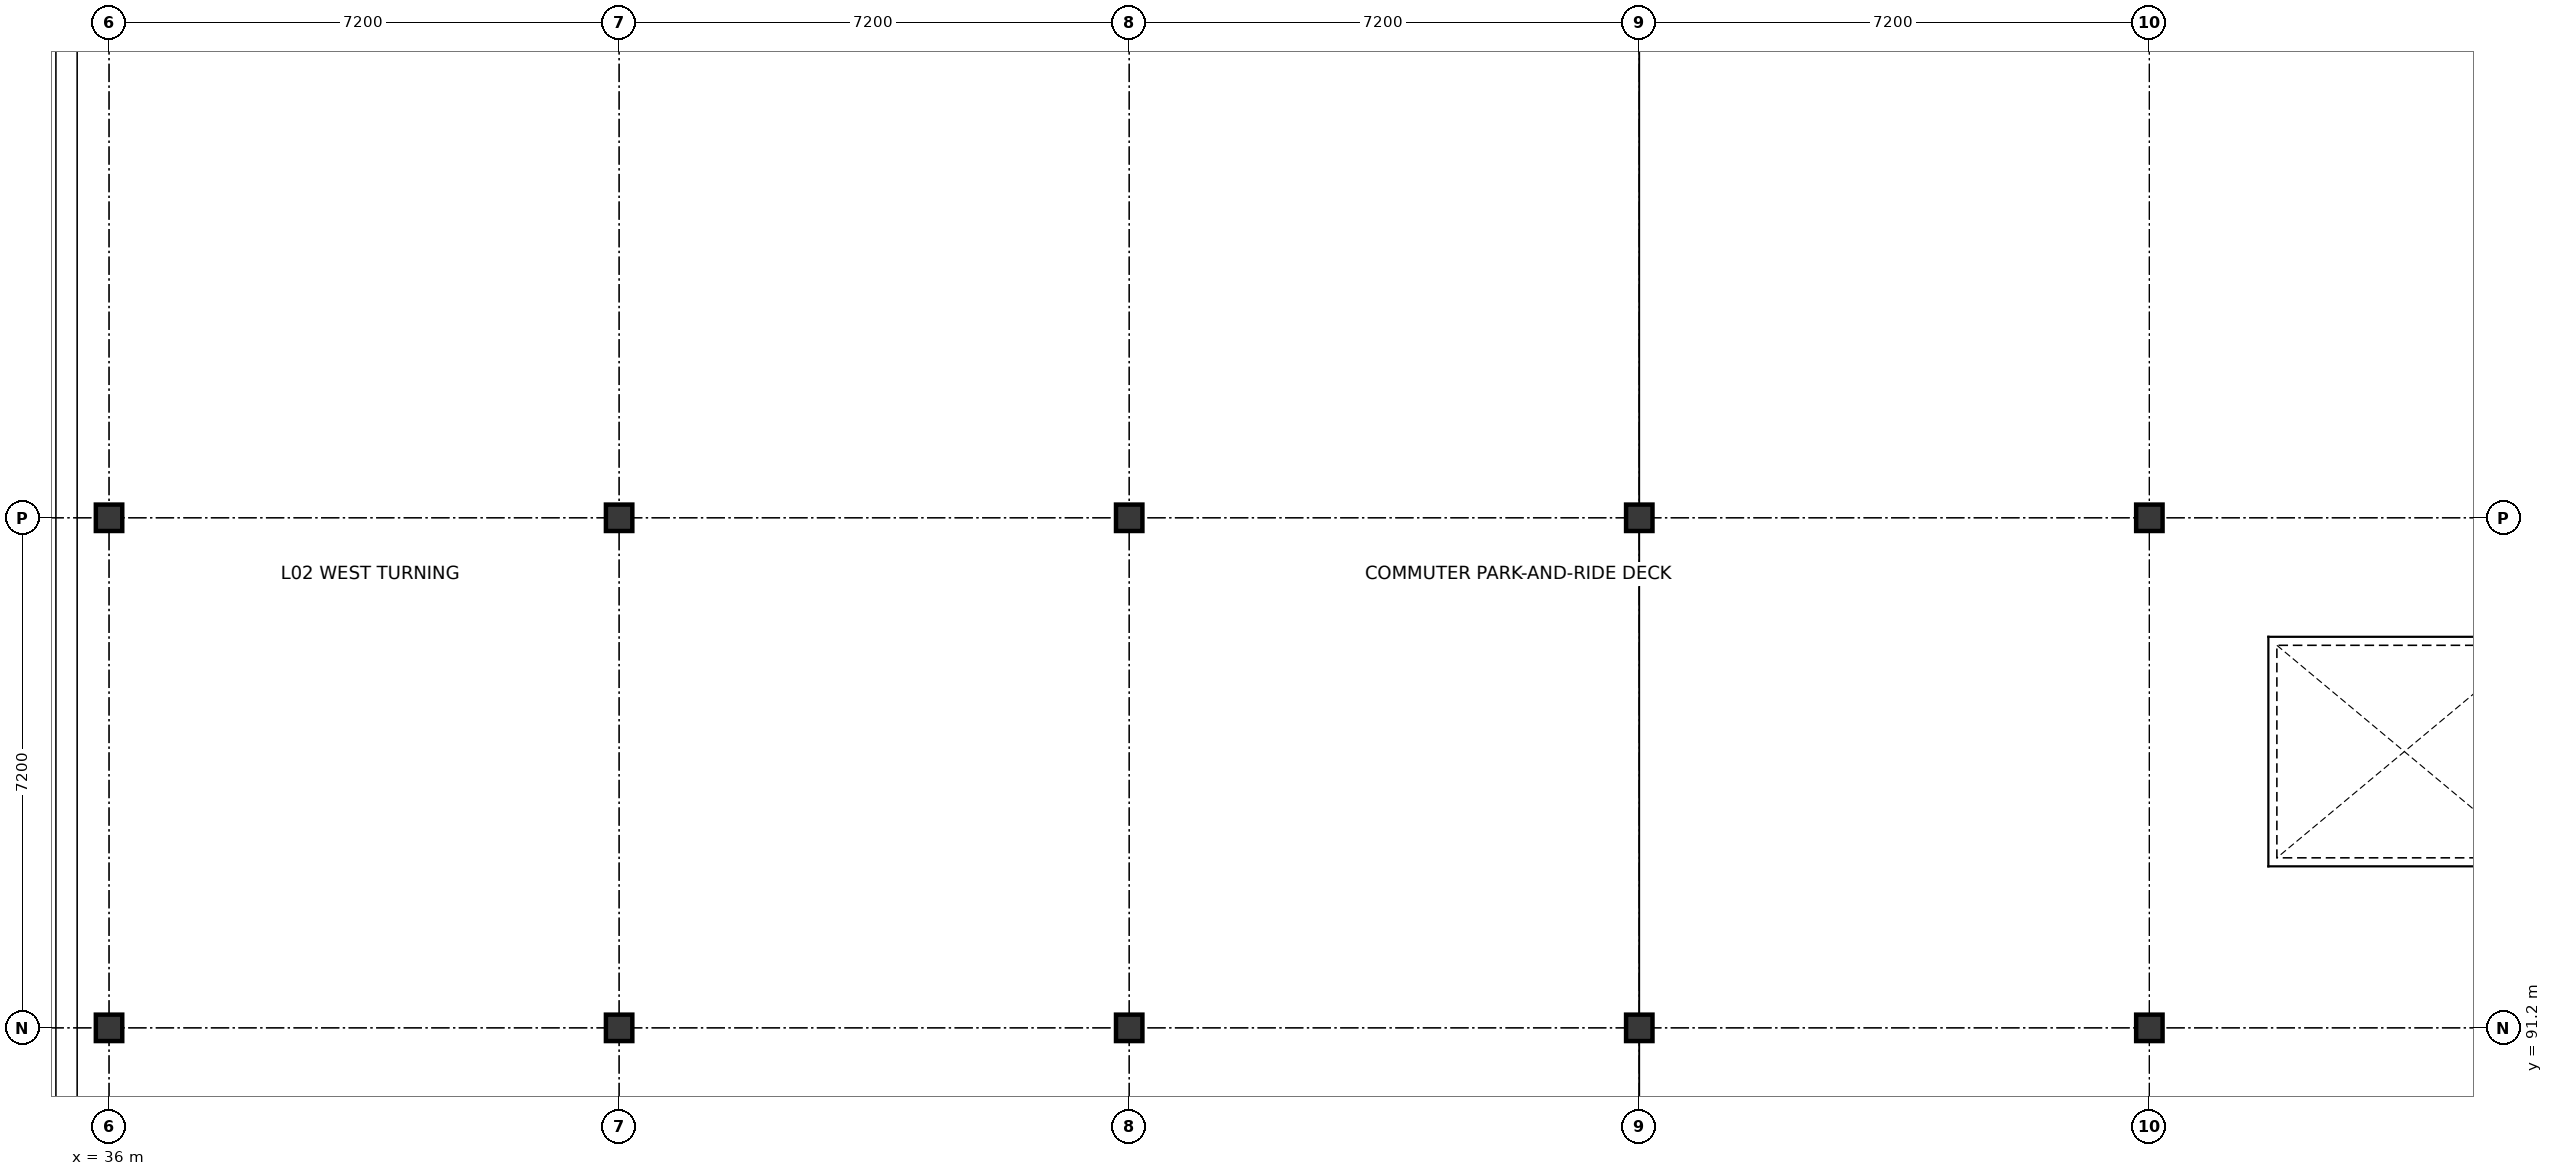
"""IFC4 building model, lengths in metres.
Left out: names, types, materials, properties, quantities, classifications, styles, units other than length and angle.
Written with IfcOpenShell. Run it as: python <this file> out.ifc"""

import sys

from ifc_helpers import new_model, si_unit, direction, frame, origin, origin_2d, place, context, subcontext, project, spatial, i_section, extrude, element, save


model = new_model("IFC4")
c1 = context("Model", 3, precision=1e-05, world=origin(), true_north=direction((0.0, 1.0)))
c2 = subcontext(c1, "Body", "Model", "MODEL_VIEW")
j1 = project(units=[si_unit("LENGTHUNIT", "METRE"), si_unit("PLANEANGLEUNIT", "RADIAN")], contexts=[c1])
p1 = place(None, origin())
s1 = spatial("IfcSite", under=j1, at=p1, CompositionType="ELEMENT")
p2 = place(p1, origin())
s2 = spatial("IfcBuilding", under=s1, at=p2, CompositionType="ELEMENT")
p3 = place(p2, frame((0.0, 0.0, 9.3)))
s3 = spatial("IfcBuildingStorey", under=s2, at=p3, CompositionType="ELEMENT", Elevation=9.3)
for number, where, z_axis, x_axis in (
    (1, (36.0, 91.2, 0.0), (0.0, 0.0, 1.0), (1.0, 0.0, 0.0)),
    (2, (36.0, 98.4, 0.0), (0.0, 0.0, 1.0), (1.0, 0.0, 0.0)),
    (3, (43.2, 91.2, 0.0), (0.0, 0.0, 1.0), (1.0, 0.0, 0.0)),
    (4, (43.2, 98.4, 0.0), (0.0, 0.0, 1.0), (1.0, 0.0, 0.0)),
    (5, (50.4, 91.2, 0.0), (0.0, 0.0, 1.0), (1.0, 0.0, 0.0)),
    (6, (50.4, 98.4, 0.0), (0.0, 0.0, 1.0), (1.0, 0.0, 0.0)),
    (7, (57.6, 91.2, 0.0), (0.0, 0.0, 1.0), (1.0, 0.0, 0.0)),
    (8, (57.6, 98.4, 0.0), (0.0, 0.0, 1.0), (1.0, 0.0, 0.0)),
    (9, (64.8, 91.2, 0.0), (0.0, 0.0, 1.0), (1.0, 0.0, 0.0)),
    (10, (64.8, 98.4, 0.0), (0.0, 0.0, 1.0), (1.0, 0.0, 0.0)),
):
    element("IfcColumn", number, at=place(p3, frame(where, z_axis=z_axis, x_axis=x_axis)), inside=s3, PredefinedType="COLUMN", context=c2, shape_type="SweptSolid", body=[
        extrude(i_section(OverallWidth=0.373, OverallDepth=0.373, WebThickness=0.016, FlangeThickness=0.026, FilletRadius=0.015, at=origin_2d()), origin(), (0.0, 0.0, 1.0), 3.9),
    ])
save(model, sys.argv[1])
